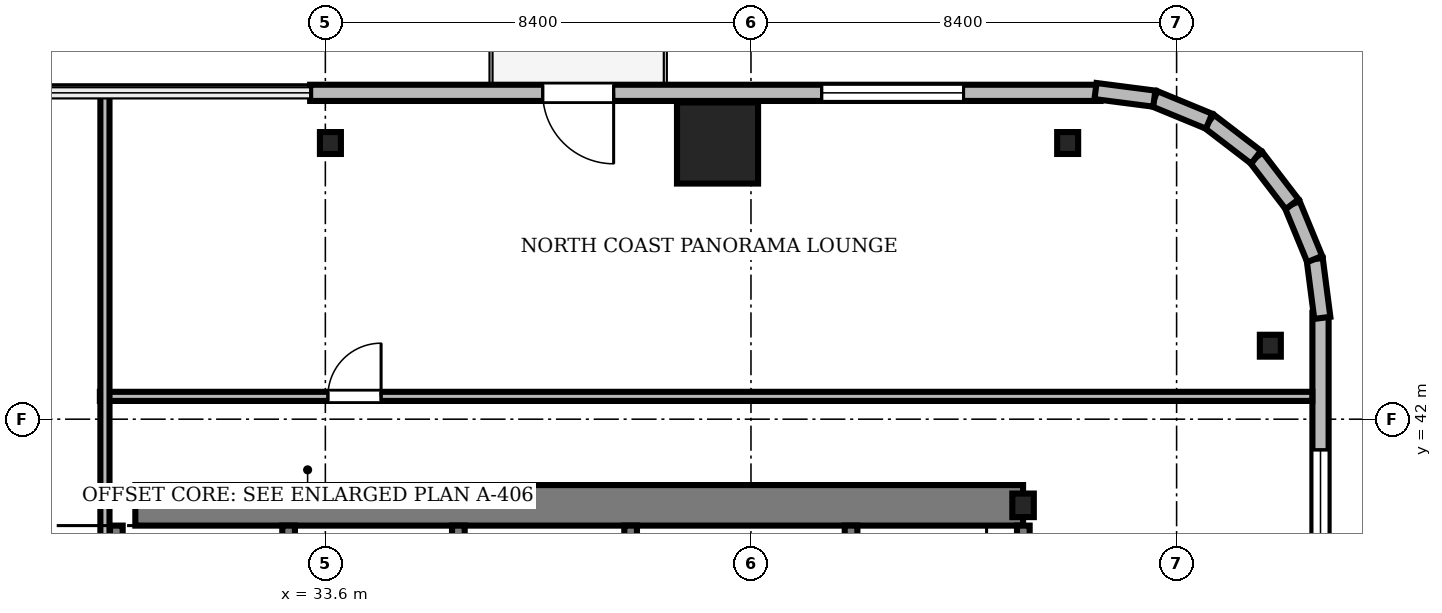
"""IFC4 building model, lengths in metres.
Left out: names, types, materials, properties, quantities, classifications, styles, units other than length and angle.
Written with IfcOpenShell. Run it as: python <this file> out.ifc"""

import sys

from ifc_helpers import new_model, si_unit, direction, frame, frame_2d, origin, origin_2d, place, context, subcontext, project, spatial, rectangle, i_section, extrude, source, transform, mapped, element, fill, save


model = new_model("IFC4")
c1 = context("Model", 3, precision=1e-05, world=origin(), true_north=direction((0.0, 1.0)))
c2 = subcontext(c1, "Body", "Model", "MODEL_VIEW")
j1 = project(units=[si_unit("LENGTHUNIT", "METRE"), si_unit("PLANEANGLEUNIT", "RADIAN")], contexts=[c1])
p1 = place(None, origin())
s1 = spatial("IfcSite", under=j1, at=p1, CompositionType="ELEMENT")
p2 = place(p1, origin())
s2 = spatial("IfcBuilding", under=s1, at=p2, CompositionType="ELEMENT")
p3 = place(p2, frame((0.0, 0.0, 148.3)))
s3 = spatial("IfcBuildingStorey", under=s2, at=p3, CompositionType="ELEMENT", Elevation=148.3)
m1 = source(origin(), c2, "Body", "SweptSolid", [
    extrude(rectangle(XDim=17.52, YDim=0.8, at=frame_2d((8.76, 0.0))), origin(), (0.0, 0.0, 1.0), 3.46),
])
p4 = place(p3, frame((29.85, 40.3, 0.0), z_axis=(0.0, 0.0, 1.0), x_axis=(1.0, 0.0, 0.0)))
e1 = element("IfcWall", 1, at=p4, inside=s3, PredefinedType="SHEAR", context=c2, shape_type="MappedRepresentation", body=[
    mapped(m1, transform((0.0, 0.0, 0.0), scale=1.0)),
])
m2 = source(origin(), c2, "Body", "SweptSolid", [
    extrude(i_section(OverallWidth=0.424, OverallDepth=0.465, WebThickness=0.035, FlangeThickness=0.056, FilletRadius=0.015, at=origin_2d()), origin(), (0.0, 0.0, 1.0), 3.46),
])
p5 = place(p3, frame((47.37, 40.3, 0.0), z_axis=(0.0, 0.0, 1.0), x_axis=(1.0, 0.0, 0.0)))
e2 = element("IfcColumn", 2, at=p5, inside=s3, PredefinedType="COLUMN", context=c2, shape_type="MappedRepresentation", body=[
    mapped(m2, transform((0.0, 0.0, 0.0), scale=1.0)),
])
m3 = source(origin(), c2, "Body", "SweptSolid", [
    extrude(rectangle(XDim=1.6, YDim=1.6, at=origin_2d()), origin(), (0.0, 0.0, 1.0), 3.46),
])
p6 = place(p3, frame((41.34, 47.45, 0.0), z_axis=(0.0, 0.0, 1.0), x_axis=(1.0, 0.0, 0.0)))
e3 = element("IfcColumn", 3, at=p6, inside=s3, PredefinedType="COLUMN", context=c2, shape_type="MappedRepresentation", body=[
    mapped(m3, transform((0.0, 0.0, 0.0), scale=1.0)),
])
m4 = source(origin(), c2, "Body", "SweptSolid", [
    extrude(i_section(OverallWidth=0.414, OverallDepth=0.432, WebThickness=0.026, FlangeThickness=0.04, FilletRadius=0.015, at=origin_2d()), origin(), (0.0, 0.0, 1.0), 3.46),
])
for number, where, z_axis, x_axis in (
    (4, (52.25, 43.45, 0.0), (0.0, 0.0, 1.0), (1.0, 0.0, 0.0)),
    (5, (48.25, 47.45, 0.0), (0.0, 0.0, 1.0), (1.0, 0.0, 0.0)),
    (6, (33.7, 47.45, 0.0), (0.0, 0.0, 1.0), (1.0, 0.0, 0.0)),
):
    element("IfcColumn", number, at=place(p3, frame(where, z_axis=z_axis, x_axis=x_axis)), inside=s3, PredefinedType="COLUMN", context=c2, shape_type="MappedRepresentation", body=[
        mapped(m4, transform((0.0, 0.0, 0.0), scale=1.0)),
    ])
m5 = source(origin(), c2, "Body", "SweptSolid", [
    extrude(rectangle(XDim=15.6, YDim=0.32, at=frame_2d((7.8, 0.0))), origin(), (0.0, 0.0, 1.0), 3.46),
])
p7 = place(p3, frame((48.9, 48.44, 0.0), z_axis=(0.0, 0.0, 1.0), x_axis=(-1.0, 0.0, 0.0)))
e7 = element("IfcWall", 7, at=p7, inside=s3, PredefinedType="SOLIDWALL", context=c2, shape_type="MappedRepresentation", body=[
    mapped(m5, transform((0.0, 0.0, 0.0), scale=1.0)),
])
m6 = source(origin(), c2, "Body", "SweptSolid", [
    extrude(rectangle(XDim=1.4, YDim=2.3, at=frame_2d((0.7, 1.15))), frame((0.0, 0.17, 0.0), z_axis=(0.0, -1.0, 0.0), x_axis=(1.0, 0.0, 0.0)), (0.0, 0.0, 1.0), 0.34),
])
p8 = place(p7, frame((9.61, 0.0, 0.0)))
e8 = element("IfcOpeningElement", 8, at=p8, cuts=e7, PredefinedType="OPENING", context=c2, shape_type="MappedRepresentation", body=[
    mapped(m6, transform((0.0, 0.0, 0.0), scale=1.0)),
])
m7 = source(origin(), c2, "Body", "SweptSolid", [
    extrude(rectangle(XDim=2.8, YDim=2.4, at=frame_2d((1.4, 1.2))), frame((0.0, 0.17, 0.0), z_axis=(0.0, -1.0, 0.0), x_axis=(1.0, 0.0, 0.0)), (0.0, 0.0, 1.0), 0.34),
])
p9 = place(p7, frame((2.705, 0.0, 0.72)))
e9 = element("IfcOpeningElement", 9, at=p9, cuts=e7, PredefinedType="OPENING", context=c2, shape_type="MappedRepresentation", body=[
    mapped(m7, transform((0.0, 0.0, 0.0), scale=1.0)),
])
m8 = source(origin(), c2, "Body", "SweptSolid", [
    extrude(rectangle(XDim=15.6, YDim=0.32, at=frame_2d((7.8, 0.0))), origin(), (0.0, 0.0, 1.0), 3.46),
])
p10 = place(p3, frame((53.24, 28.5, 0.0), z_axis=(0.0, 0.0, 1.0), x_axis=(0.0, 1.0, 0.0)))
e10 = element("IfcWall", 10, at=p10, inside=s3, PredefinedType="SOLIDWALL", context=c2, shape_type="MappedRepresentation", body=[
    mapped(m8, transform((0.0, 0.0, 0.0), scale=1.0)),
])
p11 = place(p10, frame((10.095, 0.0, 0.72)))
e11 = element("IfcOpeningElement", 11, at=p11, cuts=e10, PredefinedType="OPENING", context=c2, shape_type="MappedRepresentation", body=[
    mapped(m7, transform((0.0, 0.0, 0.0), scale=1.0)),
])
m9 = source(origin(), c2, "Body", "SweptSolid", [
    extrude(rectangle(XDim=1.17, YDim=0.32, at=frame_2d((0.585, 0.0))), origin(), (0.0, 0.0, 1.0), 3.46),
])
p12 = place(p3, frame((53.276, 44.0, 0.0), z_axis=(0.0, 0.0, 1.0), x_axis=(-0.128295670475, 0.991735963317, 0.0)))
e12 = element("IfcWall", 12, at=p12, inside=s3, PredefinedType="SOLIDWALL", context=c2, shape_type="MappedRepresentation", body=[
    mapped(m9, transform((0.0, 0.0, 0.0), scale=1.0)),
])
m10 = source(origin(), c2, "Body", "SweptSolid", [
    extrude(rectangle(XDim=1.169, YDim=0.32, at=frame_2d((0.584, 0.0))), origin(), (0.0, 0.0, 1.0), 3.46),
])
p13 = place(p3, frame((53.125, 45.16, 0.0), z_axis=(0.0, 0.0, 1.0), x_axis=(-0.381054331552, 0.924552646638, 0.0)))
e13 = element("IfcWall", 13, at=p13, inside=s3, PredefinedType="SOLIDWALL", context=c2, shape_type="MappedRepresentation", body=[
    mapped(m10, transform((0.0, 0.0, 0.0), scale=1.0)),
])
m11 = source(origin(), c2, "Body", "SweptSolid", [
    extrude(rectangle(XDim=1.169, YDim=0.32, at=frame_2d((0.584, 0.0))), origin(), (0.0, 0.0, 1.0), 3.46),
])
p14 = place(p3, frame((52.68, 46.241, 0.0), z_axis=(0.0, 0.0, 1.0), x_axis=(-0.608387696831, 0.793639975269, 0.0)))
e14 = element("IfcWall", 14, at=p14, inside=s3, PredefinedType="SOLIDWALL", context=c2, shape_type="MappedRepresentation", body=[
    mapped(m11, transform((0.0, 0.0, 0.0), scale=1.0)),
])
m12 = source(origin(), c2, "Body", "SweptSolid", [
    extrude(rectangle(XDim=1.169, YDim=0.32, at=frame_2d((0.584, 0.0))), origin(), (0.0, 0.0, 1.0), 3.46),
])
p15 = place(p3, frame((51.969, 47.169, 0.0), z_axis=(0.0, 0.0, 1.0), x_axis=(-0.793663520347, 0.608356981114, 0.0)))
e15 = element("IfcWall", 15, at=p15, inside=s3, PredefinedType="SOLIDWALL", context=c2, shape_type="MappedRepresentation", body=[
    mapped(m12, transform((0.0, 0.0, 0.0), scale=1.0)),
])
p16 = place(p3, frame((51.041, 47.88, 0.0), z_axis=(0.0, 0.0, 1.0), x_axis=(-0.924552646638, 0.381054331552, 0.0)))
e16 = element("IfcWall", 16, at=p16, inside=s3, PredefinedType="SOLIDWALL", context=c2, shape_type="MappedRepresentation", body=[
    mapped(m10, transform((0.0, 0.0, 0.0), scale=1.0)),
])
p17 = place(p3, frame((49.96, 48.325, 0.0), z_axis=(0.0, 0.0, 1.0), x_axis=(-0.991735963317, 0.128295670475, 0.0)))
e17 = element("IfcWall", 17, at=p17, inside=s3, PredefinedType="SOLIDWALL", context=c2, shape_type="MappedRepresentation", body=[
    mapped(m9, transform((0.0, 0.0, 0.0), scale=1.0)),
])
m13 = source(origin(), c2, "Body", "SweptSolid", [
    extrude(rectangle(XDim=9.25, YDim=0.25, at=frame_2d((4.625, 0.0))), origin(), (0.0, 0.0, 1.0), 3.5),
])
for number, where, z_axis, x_axis in (
    (18, (29.475, 30.65, 0.0), (0.0, 0.0, 1.0), (0.0, 1.0, 0.0)),
    (19, (32.875, 30.65, 0.0), (0.0, 0.0, 1.0), (0.0, 1.0, 0.0)),
    (20, (36.225, 30.65, 0.0), (0.0, 0.0, 1.0), (0.0, 1.0, 0.0)),
    (21, (39.625, 30.65, 0.0), (0.0, 0.0, 1.0), (0.0, 1.0, 0.0)),
    (22, (43.975, 30.65, 0.0), (0.0, 0.0, 1.0), (0.0, 1.0, 0.0)),
    (23, (47.375, 30.65, 0.0), (0.0, 0.0, 1.0), (0.0, 1.0, 0.0)),
):
    element("IfcWall", number, at=place(p3, frame(where, z_axis=z_axis, x_axis=x_axis)), inside=s3, PredefinedType="SOLIDWALL", context=c2, shape_type="MappedRepresentation", body=[
        mapped(m13, transform((0.0, 0.0, 0.0), scale=1.0)),
    ])
m14 = source(origin(), c2, "Body", "SweptSolid", [
    extrude(rectangle(XDim=23.928, YDim=0.18, at=frame_2d((11.964, 0.0))), origin(), (0.0, 0.0, 1.0), 2.702),
])
p18 = place(p3, frame((29.15, 42.45, 0.0), z_axis=(0.0, 0.0, 1.0), x_axis=(1.0, 0.0, 0.0)))
e24 = element("IfcWall", 24, at=p18, inside=s3, PredefinedType="PARTITIONING", context=c2, shape_type="MappedRepresentation", body=[
    mapped(m14, transform((0.0, 0.0, 0.0), scale=1.0)),
])
m15 = source(origin(), c2, "Body", "SweptSolid", [
    extrude(rectangle(XDim=1.05, YDim=2.2, at=frame_2d((0.525, 1.1))), frame((0.0, 0.1, 0.0), z_axis=(0.0, -1.0, 0.0), x_axis=(1.0, 0.0, 0.0)), (0.0, 0.0, 1.0), 0.2),
])
p19 = place(p18, frame((4.5, 0.0, 0.0)))
e25 = element("IfcOpeningElement", 25, at=p19, cuts=e24, PredefinedType="OPENING", context=c2, shape_type="MappedRepresentation", body=[
    mapped(m15, transform((0.0, 0.0, 0.0), scale=1.0)),
])
m16 = source(origin(), c2, "Body", "SweptSolid", [
    extrude(rectangle(XDim=11.45, YDim=0.18, at=frame_2d((5.725, 0.0))), origin(), (0.0, 0.0, 1.0), 2.702),
])
p20 = place(p3, frame((29.25, 37.02, 0.0), z_axis=(0.0, 0.0, 1.0), x_axis=(0.0, 1.0, 0.0)))
e26 = element("IfcWall", 26, at=p20, inside=s3, PredefinedType="PARTITIONING", context=c2, shape_type="MappedRepresentation", body=[
    mapped(m16, transform((0.0, 0.0, 0.0), scale=1.0)),
])
m17 = source(origin(), c2, "Body", "SweptSolid", [
    extrude(rectangle(XDim=1.4, YDim=2.3, at=frame_2d((0.7, 1.15))), frame((0.0, 0.025, 0.0), z_axis=(0.0, -1.0, 0.0), x_axis=(1.0, 0.0, 0.0)), (0.0, 0.0, 1.0), 0.05),
])
p21 = place(p8, frame((1.4, 0.0, 0.0), z_axis=(0.0, 0.0, 1.0), x_axis=(-1.0, 0.0, 0.0)))
e27 = element("IfcDoor", 27, at=p21, inside=s3, OperationType="DOUBLE_DOOR_SLIDING", PredefinedType="DOOR", context=c2, shape_type="MappedRepresentation", body=[
    mapped(m17, transform((0.0, 0.0, 0.0), scale=1.0)),
])
fill(e8, e27)
m18 = source(origin(), c2, "Body", "SweptSolid", [
    extrude(rectangle(XDim=2.8, YDim=2.4, at=frame_2d((1.4, 1.2))), frame((0.0, 0.03, 0.0), z_axis=(0.0, -1.0, 0.0), x_axis=(1.0, 0.0, 0.0)), (0.0, 0.0, 1.0), 0.06),
])
p22 = place(p9, origin())
e28 = element("IfcWindow", 28, at=p22, inside=s3, PartitioningType="SINGLE_PANEL", PredefinedType="WINDOW", context=c2, shape_type="MappedRepresentation", body=[
    mapped(m18, transform((0.0, 0.0, 0.0), scale=1.0)),
])
fill(e9, e28)
p23 = place(p11, origin())
e29 = element("IfcWindow", 29, at=p23, inside=s3, PartitioningType="SINGLE_PANEL", PredefinedType="WINDOW", context=c2, shape_type="MappedRepresentation", body=[
    mapped(m18, transform((0.0, 0.0, 0.0), scale=1.0)),
])
fill(e11, e29)
m19 = source(origin(), c2, "Body", "SweptSolid", [
    extrude(rectangle(XDim=1.05, YDim=2.2, at=frame_2d((0.525, 1.1))), frame((0.0, 0.025, 0.0), z_axis=(0.0, -1.0, 0.0), x_axis=(1.0, 0.0, 0.0)), (0.0, 0.0, 1.0), 0.05),
])
p24 = place(p19, origin())
e30 = element("IfcDoor", 30, at=p24, inside=s3, OperationType="SINGLE_SWING_RIGHT", PredefinedType="DOOR", context=c2, shape_type="MappedRepresentation", body=[
    mapped(m19, transform((0.0, 0.0, 0.0), scale=1.0)),
])
fill(e25, e30)
save(model, sys.argv[1])
